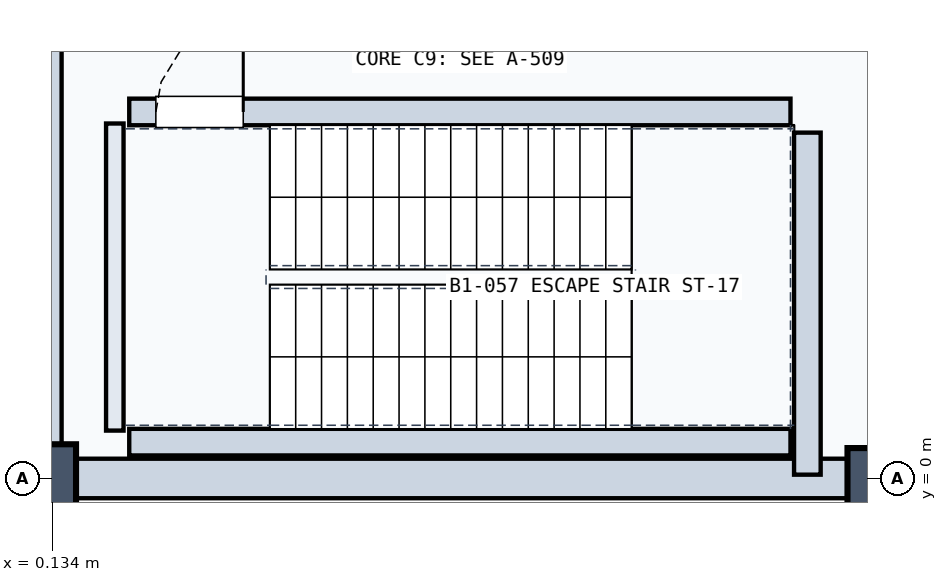
"""IFC4 building model, lengths in metres.
Left out: names, types, materials, properties, quantities, classifications, styles, units other than length and angle.
Written with IfcOpenShell. Run it as: python <this file> out.ifc"""

import sys

from ifc_helpers import new_model, si_unit, direction, frame, frame_2d, origin, origin_with_axes, origin_2d, place, context, subcontext, project, spatial, rectangle, circle, extrude, element, fill, save


model = new_model("IFC4")
c1 = context("Model", 3, precision=1e-05, world=origin(), true_north=direction((0.0, 1.0)))
c2 = subcontext(c1, "Body", "Model", "MODEL_VIEW")
j1 = project(units=[si_unit("LENGTHUNIT", "METRE"), si_unit("PLANEANGLEUNIT", "RADIAN")], contexts=[c1])
p1 = place(None, origin())
s1 = spatial("IfcSite", under=j1, at=p1, CompositionType="ELEMENT")
p2 = place(p1, origin())
s2 = spatial("IfcBuilding", under=s1, at=p2, CompositionType="ELEMENT")
p3 = place(p2, frame((0.0, 0.0, -5.4)))
s3 = spatial("IfcBuildingStorey", under=s2, at=p3, CompositionType="ELEMENT", Elevation=-5.4)
p4 = place(p3, origin_with_axes())
e1 = element("IfcColumn", 1, at=p4, inside=s3, PredefinedType="COLUMN", context=c2, shape_type="SweptSolid", body=[
    extrude(circle(Radius=0.45, at=origin_2d()), origin(), (0.0, 0.0, 1.0), 5.4),
])
p5 = place(p3, frame((11.0, 0.0, 0.0), z_axis=(0.0, 0.0, 1.0), x_axis=(1.0, 0.0, 0.0)))
e2 = element("IfcColumn", 2, at=p5, inside=s3, PredefinedType="COLUMN", context=c2, shape_type="SweptSolid", body=[
    extrude(circle(Radius=0.4, at=origin_2d()), origin(), (0.0, 0.0, 1.0), 5.4),
])
p6 = place(p3, frame((0.22, 0.0, 0.0), z_axis=(0.0, 0.0, 1.0), x_axis=(1.0, 0.0, 0.0)))
e3 = element("IfcWall", 3, at=p6, inside=s3, PredefinedType="SOLIDWALL", context=c2, shape_type="SweptSolid", body=[
    extrude(rectangle(XDim=10.56, YDim=0.52, at=frame_2d((5.28, 0.0))), origin(), (0.0, 0.0, 1.0), 4.28),
])
p7 = place(p3, frame((0.0, 0.22, 0.0), z_axis=(0.0, 0.0, 1.0), x_axis=(0.0, 1.0, 0.0)))
e4 = element("IfcWall", 4, at=p7, inside=s3, PredefinedType="SOLIDWALL", context=c2, shape_type="SweptSolid", body=[
    extrude(rectangle(XDim=10.56, YDim=0.52, at=frame_2d((5.28, 0.0))), origin(), (0.0, 0.0, 1.0), 4.23),
])
p8 = place(p3, frame((0.96, 0.63, 0.0), z_axis=(0.0, 0.0, 1.0), x_axis=(0.0, 1.0, 0.0)))
e5 = element("IfcWall", 5, at=p8, inside=s3, PredefinedType="SOLIDWALL", context=c2, shape_type="SweptSolid", body=[
    extrude(rectangle(XDim=4.04, YDim=0.23, at=frame_2d((2.02, 0.0))), origin(), (0.0, 0.0, 1.0), 5.04),
])
p9 = place(p3, frame((10.072, 0.05, 0.0), z_axis=(0.0, 0.0, 1.0), x_axis=(0.0, 1.0, 0.0)))
e6 = element("IfcWall", 6, at=p9, inside=s3, PredefinedType="SOLIDWALL", context=c2, shape_type="SweptSolid", body=[
    extrude(rectangle(XDim=4.5, YDim=0.35, at=frame_2d((2.25, 0.0))), origin(), (0.0, 0.0, 1.0), 5.04),
])
p10 = place(p3, frame((1.15, 0.478, 0.0), z_axis=(0.0, 0.0, 1.0), x_axis=(1.0, 0.0, 0.0)))
e7 = element("IfcWall", 7, at=p10, inside=s3, PredefinedType="SOLIDWALL", context=c2, shape_type="SweptSolid", body=[
    extrude(rectangle(XDim=8.7, YDim=0.35, at=frame_2d((4.35, 0.0))), origin(), (0.0, 0.0, 1.0), 5.04),
])
p11 = place(p3, frame((1.15, 4.822, 0.0), z_axis=(0.0, 0.0, 1.0), x_axis=(1.0, 0.0, 0.0)))
e8 = element("IfcWall", 8, at=p11, inside=s3, PredefinedType="SOLIDWALL", context=c2, shape_type="SweptSolid", body=[
    extrude(rectangle(XDim=8.7, YDim=0.35, at=frame_2d((4.35, 0.0))), origin(), (0.0, 0.0, 1.0), 5.04),
])
p12 = place(p11, frame((0.35, 0.0, 0.0)))
e9 = element("IfcOpeningElement", 9, at=p12, cuts=e8, PredefinedType="OPENING", context=c2, shape_type="SweptSolid", body=[
    extrude(rectangle(XDim=1.15, YDim=2.2, at=frame_2d((0.575, 1.1))), frame((0.0, 0.185, 0.0), z_axis=(0.0, -1.0, 0.0), x_axis=(1.0, 0.0, 0.0)), (0.0, 0.0, 1.0), 0.37),
])
p13 = place(p12, origin())
e10 = element("IfcDoor", 10, at=p13, inside=s3, OperationType="SINGLE_SWING_RIGHT", PredefinedType="DOOR", context=c2, shape_type="SweptSolid", body=[
    extrude(rectangle(XDim=1.15, YDim=2.2, at=frame_2d((0.575, 1.1))), frame((0.0, 0.025, 0.0), z_axis=(0.0, -1.0, 0.0), x_axis=(1.0, 0.0, 0.0)), (0.0, 0.0, 1.0), 0.05),
])
fill(e9, e10)
save(model, sys.argv[1])
